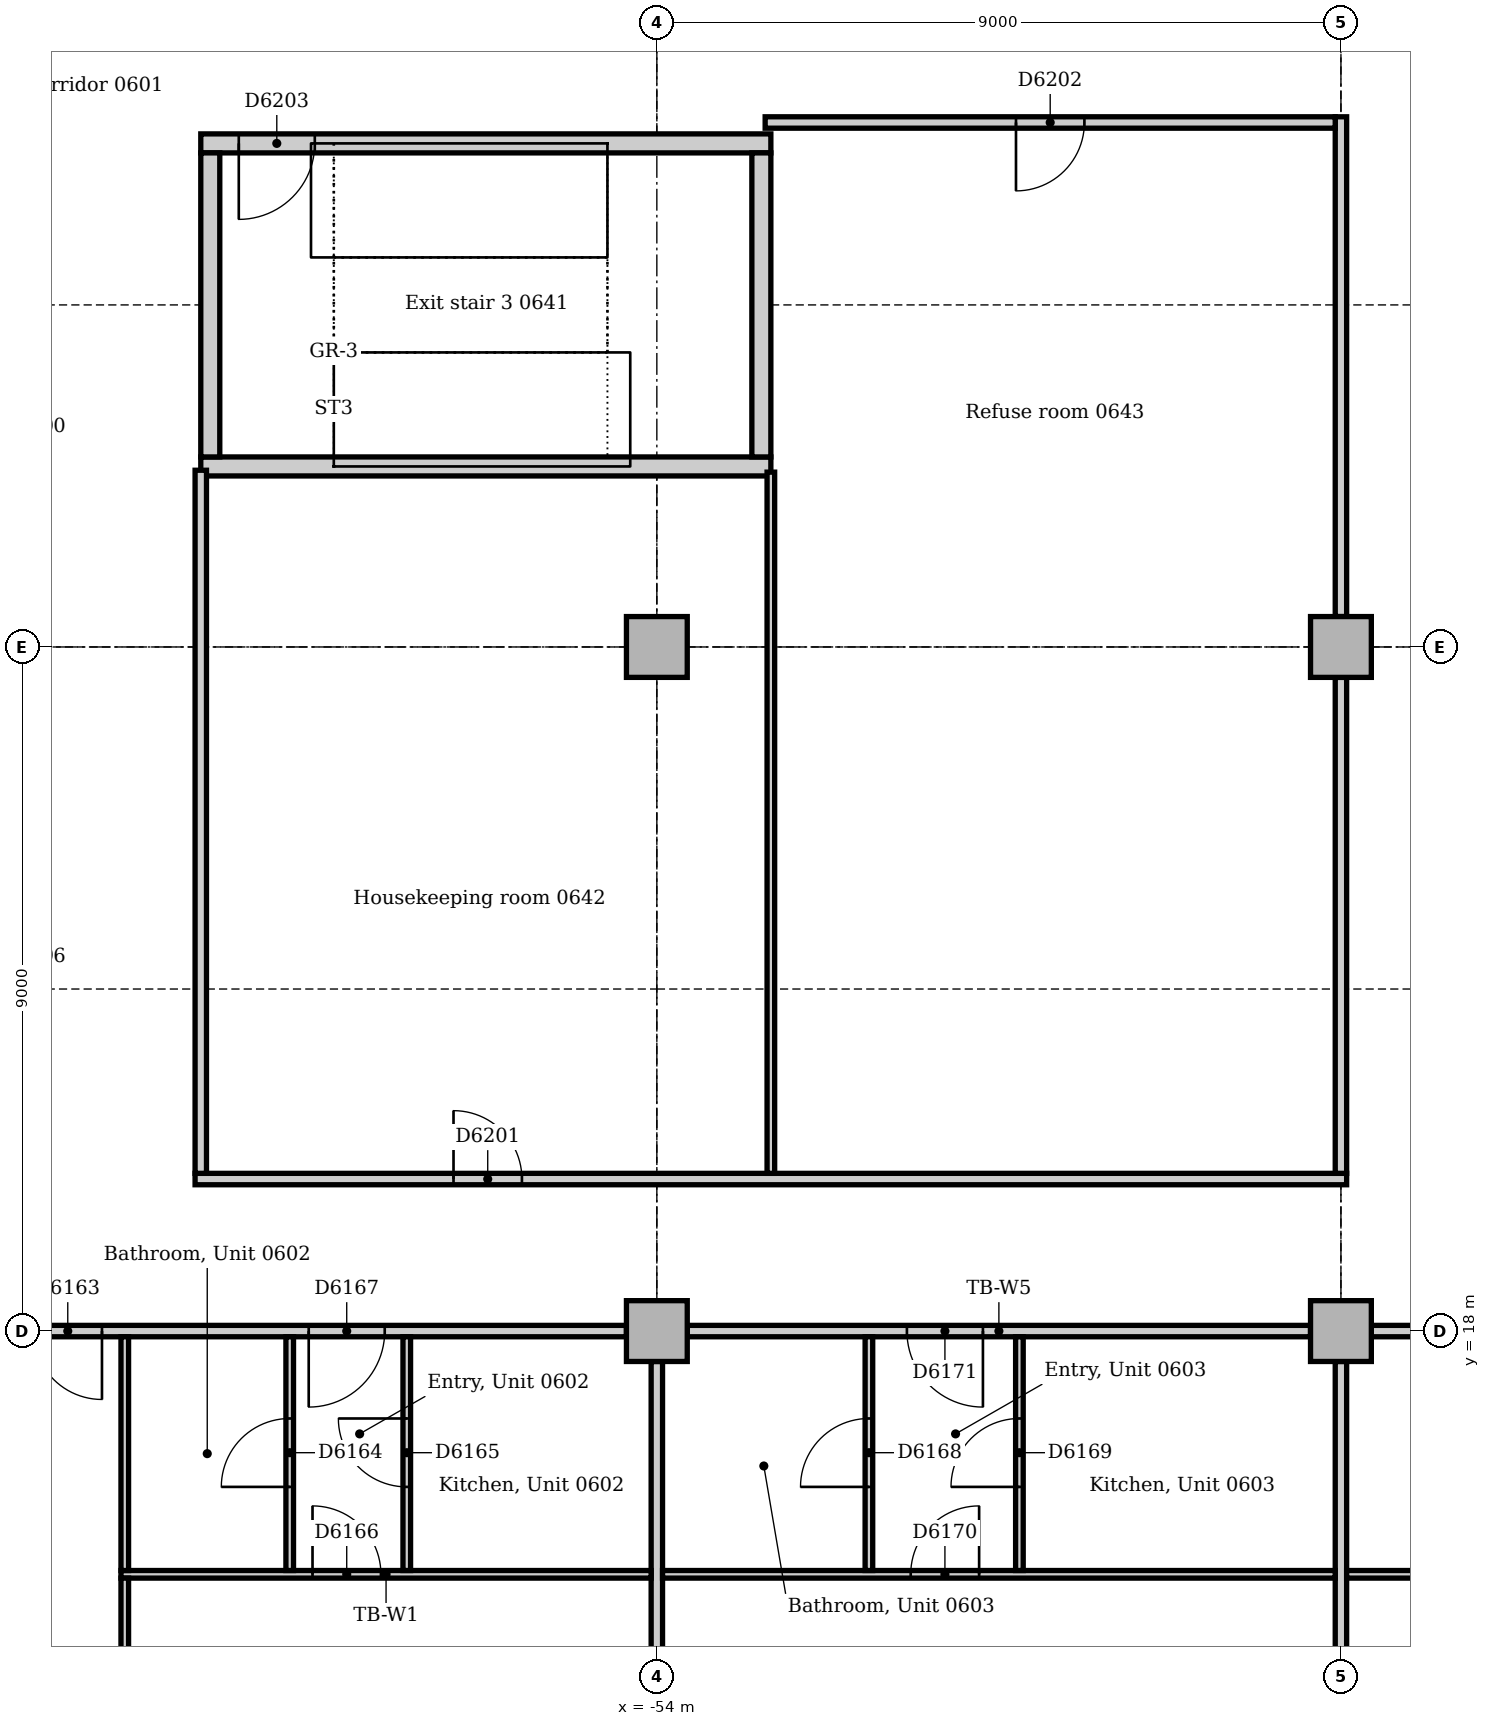
"""IFC4 building model, lengths in metres.
Left out: names, types, materials, properties, quantities, classifications, styles, units other than length and angle.
Written with IfcOpenShell. Run it as: python <this file> out.ifc"""

import sys

from ifc_helpers import new_model, si_unit, direction, frame, frame_2d, origin, origin_2d, place, context, subcontext, project, spatial, rectangle, extrude, element, fill, save


model = new_model("IFC4")
c1 = context("Model", 3, precision=1e-05, world=origin(), true_north=direction((0.0, 1.0)))
c2 = subcontext(c1, "Body", "Model", "MODEL_VIEW")
j1 = project(units=[si_unit("LENGTHUNIT", "METRE"), si_unit("PLANEANGLEUNIT", "RADIAN")], contexts=[c1])
p1 = place(None, origin())
s1 = spatial("IfcSite", under=j1, at=p1, CompositionType="ELEMENT")
p2 = place(p1, origin())
s2 = spatial("IfcBuilding", under=s1, at=p2, CompositionType="ELEMENT")
p3 = place(p2, frame((0.0, 0.0, 30.0)))
s3 = spatial("IfcBuildingStorey", under=s2, at=p3, CompositionType="ELEMENT", Elevation=30.0)
p4 = place(p3, frame((-60.0, 29.375, 0.0), z_axis=(0.0, 0.0, 1.0), x_axis=(1.0, 0.0, 0.0)))
e1 = element("IfcWall", 1, at=p4, inside=s3, PredefinedType="SOLIDWALL", context=c2, shape_type="SweptSolid", body=[
    extrude(rectangle(XDim=7.5, YDim=0.25, at=frame_2d((3.75, 0.0))), origin(), (0.0, 0.0, 1.0), 4.0),
])
p5 = place(p3, frame((-52.5, 33.625, 0.0), z_axis=(0.0, 0.0, 1.0), x_axis=(-1.0, 0.0, 0.0)))
e2 = element("IfcWall", 2, at=p5, inside=s3, PredefinedType="SOLIDWALL", context=c2, shape_type="SweptSolid", body=[
    extrude(rectangle(XDim=7.5, YDim=0.25, at=frame_2d((3.75, 0.0))), origin(), (0.0, 0.0, 1.0), 4.0),
])
p6 = place(p5, frame((6.0, 0.0, 0.0)))
e3 = element("IfcOpeningElement", 3, at=p6, cuts=e2, PredefinedType="OPENING", context=c2, shape_type="SweptSolid", body=[
    extrude(rectangle(XDim=1.0, YDim=2.1, at=frame_2d((0.5, 1.05))), frame((0.0, 0.135, 0.0), z_axis=(0.0, -1.0, 0.0), x_axis=(1.0, 0.0, 0.0)), (0.0, 0.0, 1.0), 0.27),
])
for number, where, z_axis, x_axis in (
    (4, (-52.625, 29.5, 0.0), (0.0, 0.0, 1.0), (0.0, 1.0, 0.0)),
    (5, (-59.875, 33.5, 0.0), (0.0, 0.0, 1.0), (0.0, -1.0, 0.0)),
):
    element("IfcWall", number, at=place(p3, frame(where, z_axis=z_axis, x_axis=x_axis)), inside=s3, PredefinedType="SOLIDWALL", context=c2, shape_type="SweptSolid", body=[
        extrude(rectangle(XDim=4.0, YDim=0.25, at=frame_2d((2.0, 0.0))), origin(), (0.0, 0.0, 1.0), 4.0),
    ])
for number, where, z_axis, x_axis in (
    (6, (-54.0, 18.0, 0.0), (0.0, 0.0, 1.0), (1.0, 0.0, 0.0)),
    (7, (-54.0, 27.0, 0.0), (0.0, 0.0, 1.0), (1.0, 0.0, 0.0)),
    (8, (-45.0, 18.0, 0.0), (0.0, 0.0, 1.0), (1.0, 0.0, 0.0)),
    (9, (-45.0, 27.0, 0.0), (0.0, 0.0, 1.0), (1.0, 0.0, 0.0)),
):
    element("IfcColumn", number, at=place(p3, frame(where, z_axis=z_axis, x_axis=x_axis)), inside=s3, PredefinedType="COLUMN", context=c2, shape_type="SweptSolid", body=[
        extrude(rectangle(XDim=0.8, YDim=0.8, at=origin_2d()), origin(), (0.0, 0.0, 1.0), 3.85),
    ])
p7 = place(p3, frame((-44.6, 18.0, 0.0), z_axis=(0.0, 0.0, 1.0), x_axis=(1.0, 0.0, 0.0)))
e10 = element("IfcWall", 10, at=p7, inside=s3, PredefinedType="PARTITIONING", context=c2, shape_type="SweptSolid", body=[
    extrude(rectangle(XDim=8.2, YDim=0.15, at=frame_2d((4.1, 0.0))), origin(), (0.0, 0.0, 1.0), 3.15),
])
p8 = place(p7, frame((3.0, 0.0, 0.0)))
e11 = element("IfcOpeningElement", 11, at=p8, cuts=e10, PredefinedType="OPENING", context=c2, shape_type="SweptSolid", body=[
    extrude(rectangle(XDim=1.0, YDim=2.1, at=frame_2d((0.5, 1.05))), frame((0.0, 0.085, 0.0), z_axis=(0.0, -1.0, 0.0), x_axis=(1.0, 0.0, 0.0)), (0.0, 0.0, 1.0), 0.17),
])
p9 = place(p3, frame((-53.6, 18.0, 0.0), z_axis=(0.0, 0.0, 1.0), x_axis=(1.0, 0.0, 0.0)))
e12 = element("IfcWall", 12, at=p9, inside=s3, PredefinedType="PARTITIONING", context=c2, shape_type="SweptSolid", body=[
    extrude(rectangle(XDim=8.2, YDim=0.15, at=frame_2d((4.1, 0.0))), origin(), (0.0, 0.0, 1.0), 3.15),
])
p10 = place(p9, frame((2.89, 0.0, 0.0)))
e13 = element("IfcOpeningElement", 13, at=p10, cuts=e12, PredefinedType="OPENING", context=c2, shape_type="SweptSolid", body=[
    extrude(rectangle(XDim=1.0, YDim=2.1, at=frame_2d((0.5, 1.05))), frame((0.0, 0.085, 0.0), z_axis=(0.0, -1.0, 0.0), x_axis=(1.0, 0.0, 0.0)), (0.0, 0.0, 1.0), 0.17),
])
p11 = place(p3, frame((-62.6, 18.0, 0.0), z_axis=(0.0, 0.0, 1.0), x_axis=(1.0, 0.0, 0.0)))
e14 = element("IfcWall", 14, at=p11, inside=s3, PredefinedType="PARTITIONING", context=c2, shape_type="SweptSolid", body=[
    extrude(rectangle(XDim=8.2, YDim=0.15, at=frame_2d((4.1, 0.0))), origin(), (0.0, 0.0, 1.0), 3.15),
])
p12 = place(p11, frame((0.4, 0.0, 0.0)))
e15 = element("IfcOpeningElement", 15, at=p12, cuts=e14, PredefinedType="OPENING", context=c2, shape_type="SweptSolid", body=[
    extrude(rectangle(XDim=0.9, YDim=2.1, at=frame_2d((0.45, 1.05))), frame((0.0, 0.085, 0.0), z_axis=(0.0, -1.0, 0.0), x_axis=(1.0, 0.0, 0.0)), (0.0, 0.0, 1.0), 0.17),
])
p13 = place(p11, frame((4.02, 0.0, 0.0)))
e16 = element("IfcOpeningElement", 16, at=p13, cuts=e14, PredefinedType="OPENING", context=c2, shape_type="SweptSolid", body=[
    extrude(rectangle(XDim=1.0, YDim=2.1, at=frame_2d((0.5, 1.05))), frame((0.0, 0.085, 0.0), z_axis=(0.0, -1.0, 0.0), x_axis=(1.0, 0.0, 0.0)), (0.0, 0.0, 1.0), 0.17),
])
p14 = place(p3, frame((-60.075, 20.0, 0.0), z_axis=(0.0, 0.0, 1.0), x_axis=(1.0, 0.0, 0.0)))
e17 = element("IfcWall", 17, at=p14, inside=s3, PredefinedType="PARTITIONING", context=c2, shape_type="SweptSolid", body=[
    extrude(rectangle(XDim=15.15, YDim=0.15, at=frame_2d((7.575, 0.0))), origin(), (0.0, 0.0, 1.0), 3.85),
])
p15 = place(p14, frame((3.4, 0.0, 0.0)))
e18 = element("IfcOpeningElement", 18, at=p15, cuts=e17, PredefinedType="OPENING", context=c2, shape_type="SweptSolid", body=[
    extrude(rectangle(XDim=0.9, YDim=2.1, at=frame_2d((0.45, 1.05))), frame((0.0, 0.085, 0.0), z_axis=(0.0, -1.0, 0.0), x_axis=(1.0, 0.0, 0.0)), (0.0, 0.0, 1.0), 0.17),
])
p16 = place(p3, frame((-45.0, 20.075, 0.0), z_axis=(0.0, 0.0, 1.0), x_axis=(0.0, 1.0, 0.0)))
e19 = element("IfcWall", 19, at=p16, inside=s3, PredefinedType="PARTITIONING", context=c2, shape_type="SweptSolid", body=[
    extrude(rectangle(XDim=6.525, YDim=0.15, at=frame_2d((3.263, 0.0))), origin(), (0.0, 0.0, 1.0), 3.158),
])
p17 = place(p3, frame((-45.0, 27.4, 0.0), z_axis=(0.0, 0.0, 1.0), x_axis=(0.0, 1.0, 0.0)))
e20 = element("IfcWall", 20, at=p17, inside=s3, PredefinedType="PARTITIONING", context=c2, shape_type="SweptSolid", body=[
    extrude(rectangle(XDim=6.575, YDim=0.15, at=frame_2d((3.288, 0.0))), origin(), (0.0, 0.0, 1.0), 3.158),
])
p18 = place(p3, frame((-60.0, 20.075, 0.0), z_axis=(0.0, 0.0, 1.0), x_axis=(0.0, 1.0, 0.0)))
e21 = element("IfcWall", 21, at=p18, inside=s3, PredefinedType="PARTITIONING", context=c2, shape_type="SweptSolid", body=[
    extrude(rectangle(XDim=9.25, YDim=0.15, at=frame_2d((4.625, 0.0))), origin(), (0.0, 0.0, 1.0), 3.85),
])
p19 = place(p3, frame((-52.575, 33.9, 0.0), z_axis=(0.0, 0.0, 1.0), x_axis=(1.0, 0.0, 0.0)))
e22 = element("IfcWall", 22, at=p19, inside=s3, PredefinedType="PARTITIONING", context=c2, shape_type="SweptSolid", body=[
    extrude(rectangle(XDim=7.5, YDim=0.15, at=frame_2d((3.75, 0.0))), origin(), (0.0, 0.0, 1.0), 3.85),
])
p20 = place(p19, frame((3.3, 0.0, 0.0)))
e23 = element("IfcOpeningElement", 23, at=p20, cuts=e22, PredefinedType="OPENING", context=c2, shape_type="SweptSolid", body=[
    extrude(rectangle(XDim=0.9, YDim=2.1, at=frame_2d((0.45, 1.05))), frame((0.0, 0.085, 0.0), z_axis=(0.0, -1.0, 0.0), x_axis=(1.0, 0.0, 0.0)), (0.0, 0.0, 1.0), 0.17),
])
for number, where, z_axis, x_axis in (
    (24, (-54.0, 9.4, 0.0), (0.0, 0.0, 1.0), (0.0, 1.0, 0.0)),
    (25, (-45.0, 9.4, 0.0), (0.0, 0.0, 1.0), (0.0, 1.0, 0.0)),
):
    element("IfcWall", number, at=place(p3, frame(where, z_axis=z_axis, x_axis=x_axis)), inside=s3, PredefinedType="PARTITIONING", context=c2, shape_type="SweptSolid", body=[
        extrude(rectangle(XDim=8.2, YDim=0.15, at=frame_2d((4.1, 0.0))), origin(), (0.0, 0.0, 1.0), 3.158),
    ])
p21 = place(p3, frame((-61.05, 14.8, 0.0), z_axis=(0.0, 0.0, 1.0), x_axis=(1.0, 0.0, 0.0)))
e26 = element("IfcWall", 26, at=p21, inside=s3, PredefinedType="PARTITIONING", context=c2, shape_type="SweptSolid", body=[
    extrude(rectangle(XDim=6.975, YDim=0.1, at=frame_2d((3.487, 0.0))), origin(), (0.0, 0.0, 1.0), 3.85),
])
p22 = place(p21, frame((2.52, 0.0, 0.0)))
e27 = element("IfcOpeningElement", 27, at=p22, cuts=e26, PredefinedType="OPENING", context=c2, shape_type="SweptSolid", body=[
    extrude(rectangle(XDim=0.9, YDim=2.1, at=frame_2d((0.45, 1.05))), frame((0.0, 0.06, 0.0), z_axis=(0.0, -1.0, 0.0), x_axis=(1.0, 0.0, 0.0)), (0.0, 0.0, 1.0), 0.12),
])
p23 = place(p3, frame((-53.925, 14.8, 0.0), z_axis=(0.0, 0.0, 1.0), x_axis=(1.0, 0.0, 0.0)))
e28 = element("IfcWall", 28, at=p23, inside=s3, PredefinedType="PARTITIONING", context=c2, shape_type="SweptSolid", body=[
    extrude(rectangle(XDim=8.85, YDim=0.1, at=frame_2d((4.425, 0.0))), origin(), (0.0, 0.0, 1.0), 3.85),
])
p24 = place(p23, frame((3.265, 0.0, 0.0)))
e29 = element("IfcOpeningElement", 29, at=p24, cuts=e28, PredefinedType="OPENING", context=c2, shape_type="SweptSolid", body=[
    extrude(rectangle(XDim=0.9, YDim=2.1, at=frame_2d((0.45, 1.05))), frame((0.0, 0.06, 0.0), z_axis=(0.0, -1.0, 0.0), x_axis=(1.0, 0.0, 0.0)), (0.0, 0.0, 1.0), 0.12),
])
p25 = place(p3, frame((-44.925, 14.8, 0.0), z_axis=(0.0, 0.0, 1.0), x_axis=(1.0, 0.0, 0.0)))
e30 = element("IfcWall", 30, at=p25, inside=s3, PredefinedType="PARTITIONING", context=c2, shape_type="SweptSolid", body=[
    extrude(rectangle(XDim=8.85, YDim=0.1, at=frame_2d((4.425, 0.0))), origin(), (0.0, 0.0, 1.0), 3.85),
])
p26 = place(p25, frame((3.265, 0.0, 0.0)))
e31 = element("IfcOpeningElement", 31, at=p26, cuts=e30, PredefinedType="OPENING", context=c2, shape_type="SweptSolid", body=[
    extrude(rectangle(XDim=0.9, YDim=2.1, at=frame_2d((0.45, 1.05))), frame((0.0, 0.06, 0.0), z_axis=(0.0, -1.0, 0.0), x_axis=(1.0, 0.0, 0.0)), (0.0, 0.0, 1.0), 0.12),
])
p27 = place(p3, frame((-61.0, 14.85, 0.0), z_axis=(0.0, 0.0, 1.0), x_axis=(0.0, 1.0, 0.0)))
e32 = element("IfcWall", 32, at=p27, inside=s3, PredefinedType="PARTITIONING", context=c2, shape_type="SweptSolid", body=[
    extrude(rectangle(XDim=3.075, YDim=0.1, at=frame_2d((1.538, 0.0))), origin(), (0.0, 0.0, 1.0), 3.85),
])
p28 = place(p3, frame((-61.0, 4.86, 0.0), z_axis=(0.0, 0.0, 1.0), x_axis=(0.0, 1.0, 0.0)))
e33 = element("IfcWall", 33, at=p28, inside=s3, PredefinedType="PARTITIONING", context=c2, shape_type="SweptSolid", body=[
    extrude(rectangle(XDim=9.89, YDim=0.1, at=frame_2d((4.945, 0.0))), origin(), (0.0, 0.0, 1.0), 3.85),
])
p29 = place(p3, frame((-52.5, 20.075, 0.0), z_axis=(0.0, 0.0, 1.0), x_axis=(0.0, 1.0, 0.0)))
e34 = element("IfcWall", 34, at=p29, inside=s3, PredefinedType="PARTITIONING", context=c2, shape_type="SweptSolid", body=[
    extrude(rectangle(XDim=9.225, YDim=0.1, at=frame_2d((4.612, 0.0))), origin(), (0.0, 0.0, 1.0), 3.85),
])
p30 = place(p3, frame((-58.83, 14.85, 0.0), z_axis=(0.0, 0.0, 1.0), x_axis=(0.0, 1.0, 0.0)))
e35 = element("IfcWall", 35, at=p30, inside=s3, PredefinedType="PARTITIONING", context=c2, shape_type="SweptSolid", body=[
    extrude(rectangle(XDim=3.075, YDim=0.1, at=frame_2d((1.538, 0.0))), origin(), (0.0, 0.0, 1.0), 3.85),
])
p31 = place(p30, frame((1.1, 0.0, 0.0)))
e36 = element("IfcOpeningElement", 36, at=p31, cuts=e35, PredefinedType="OPENING", context=c2, shape_type="SweptSolid", body=[
    extrude(rectangle(XDim=0.9, YDim=2.1, at=frame_2d((0.45, 1.05))), frame((0.0, 0.06, 0.0), z_axis=(0.0, -1.0, 0.0), x_axis=(1.0, 0.0, 0.0)), (0.0, 0.0, 1.0), 0.12),
])
p32 = place(p3, frame((-57.29, 14.85, 0.0), z_axis=(0.0, 0.0, 1.0), x_axis=(0.0, 1.0, 0.0)))
e37 = element("IfcWall", 37, at=p32, inside=s3, PredefinedType="PARTITIONING", context=c2, shape_type="SweptSolid", body=[
    extrude(rectangle(XDim=3.075, YDim=0.1, at=frame_2d((1.538, 0.0))), origin(), (0.0, 0.0, 1.0), 3.85),
])
p33 = place(p32, frame((1.1, 0.0, 0.0)))
e38 = element("IfcOpeningElement", 38, at=p33, cuts=e37, PredefinedType="OPENING", context=c2, shape_type="SweptSolid", body=[
    extrude(rectangle(XDim=0.9, YDim=2.1, at=frame_2d((0.45, 1.05))), frame((0.0, 0.06, 0.0), z_axis=(0.0, -1.0, 0.0), x_axis=(1.0, 0.0, 0.0)), (0.0, 0.0, 1.0), 0.12),
])
p34 = place(p3, frame((-51.21, 14.85, 0.0), z_axis=(0.0, 0.0, 1.0), x_axis=(0.0, 1.0, 0.0)))
e39 = element("IfcWall", 39, at=p34, inside=s3, PredefinedType="PARTITIONING", context=c2, shape_type="SweptSolid", body=[
    extrude(rectangle(XDim=3.075, YDim=0.1, at=frame_2d((1.538, 0.0))), origin(), (0.0, 0.0, 1.0), 3.85),
])
p35 = place(p34, frame((1.1, 0.0, 0.0)))
e40 = element("IfcOpeningElement", 40, at=p35, cuts=e39, PredefinedType="OPENING", context=c2, shape_type="SweptSolid", body=[
    extrude(rectangle(XDim=0.9, YDim=2.1, at=frame_2d((0.45, 1.05))), frame((0.0, 0.06, 0.0), z_axis=(0.0, -1.0, 0.0), x_axis=(1.0, 0.0, 0.0)), (0.0, 0.0, 1.0), 0.12),
])
p36 = place(p3, frame((-49.23, 14.85, 0.0), z_axis=(0.0, 0.0, 1.0), x_axis=(0.0, 1.0, 0.0)))
e41 = element("IfcWall", 41, at=p36, inside=s3, PredefinedType="PARTITIONING", context=c2, shape_type="SweptSolid", body=[
    extrude(rectangle(XDim=3.075, YDim=0.1, at=frame_2d((1.538, 0.0))), origin(), (0.0, 0.0, 1.0), 3.85),
])
p37 = place(p36, frame((1.1, 0.0, 0.0)))
e42 = element("IfcOpeningElement", 42, at=p37, cuts=e41, PredefinedType="OPENING", context=c2, shape_type="SweptSolid", body=[
    extrude(rectangle(XDim=0.9, YDim=2.1, at=frame_2d((0.45, 1.05))), frame((0.0, 0.06, 0.0), z_axis=(0.0, -1.0, 0.0), x_axis=(1.0, 0.0, 0.0)), (0.0, 0.0, 1.0), 0.12),
])
p38 = place(p12, frame((0.9, 0.0, 0.0), z_axis=(0.0, 0.0, 1.0), x_axis=(-1.0, 0.0, 0.0)))
e43 = element("IfcDoor", 43, at=p38, inside=s3, OperationType="SINGLE_SWING_LEFT", PredefinedType="DOOR", context=c2, shape_type="SweptSolid", body=[
    extrude(rectangle(XDim=0.9, YDim=2.1, at=frame_2d((0.45, 1.05))), frame((0.0, 0.025, 0.0), z_axis=(0.0, -1.0, 0.0), x_axis=(1.0, 0.0, 0.0)), (0.0, 0.0, 1.0), 0.05),
])
fill(e15, e43)
p39 = place(p31, origin())
e44 = element("IfcDoor", 44, at=p39, inside=s3, OperationType="SINGLE_SWING_LEFT", PredefinedType="DOOR", context=c2, shape_type="SweptSolid", body=[
    extrude(rectangle(XDim=0.9, YDim=2.1, at=frame_2d((0.45, 1.05))), frame((0.0, 0.025, 0.0), z_axis=(0.0, -1.0, 0.0), x_axis=(1.0, 0.0, 0.0)), (0.0, 0.0, 1.0), 0.05),
])
fill(e36, e44)
p40 = place(p33, origin())
e45 = element("IfcDoor", 45, at=p40, inside=s3, OperationType="SINGLE_SWING_RIGHT", PredefinedType="DOOR", context=c2, shape_type="SweptSolid", body=[
    extrude(rectangle(XDim=0.9, YDim=2.1, at=frame_2d((0.45, 1.05))), frame((0.0, 0.025, 0.0), z_axis=(0.0, -1.0, 0.0), x_axis=(1.0, 0.0, 0.0)), (0.0, 0.0, 1.0), 0.05),
])
fill(e38, e45)
p41 = place(p22, origin())
e46 = element("IfcDoor", 46, at=p41, inside=s3, OperationType="SINGLE_SWING_LEFT", PredefinedType="DOOR", context=c2, shape_type="SweptSolid", body=[
    extrude(rectangle(XDim=0.9, YDim=2.1, at=frame_2d((0.45, 1.05))), frame((0.0, 0.025, 0.0), z_axis=(0.0, -1.0, 0.0), x_axis=(1.0, 0.0, 0.0)), (0.0, 0.0, 1.0), 0.05),
])
fill(e27, e46)
p42 = place(p13, frame((1.0, 0.0, 0.0), z_axis=(0.0, 0.0, 1.0), x_axis=(-1.0, 0.0, 0.0)))
e47 = element("IfcDoor", 47, at=p42, inside=s3, OperationType="SINGLE_SWING_RIGHT", PredefinedType="DOOR", context=c2, shape_type="SweptSolid", body=[
    extrude(rectangle(XDim=1.0, YDim=2.1, at=frame_2d((0.5, 1.05))), frame((0.0, 0.025, 0.0), z_axis=(0.0, -1.0, 0.0), x_axis=(1.0, 0.0, 0.0)), (0.0, 0.0, 1.0), 0.05),
])
fill(e16, e47)
p43 = place(p35, origin())
e48 = element("IfcDoor", 48, at=p43, inside=s3, OperationType="SINGLE_SWING_LEFT", PredefinedType="DOOR", context=c2, shape_type="SweptSolid", body=[
    extrude(rectangle(XDim=0.9, YDim=2.1, at=frame_2d((0.45, 1.05))), frame((0.0, 0.025, 0.0), z_axis=(0.0, -1.0, 0.0), x_axis=(1.0, 0.0, 0.0)), (0.0, 0.0, 1.0), 0.05),
])
fill(e40, e48)
p44 = place(p37, origin())
e49 = element("IfcDoor", 49, at=p44, inside=s3, OperationType="SINGLE_SWING_LEFT", PredefinedType="DOOR", context=c2, shape_type="SweptSolid", body=[
    extrude(rectangle(XDim=0.9, YDim=2.1, at=frame_2d((0.45, 1.05))), frame((0.0, 0.025, 0.0), z_axis=(0.0, -1.0, 0.0), x_axis=(1.0, 0.0, 0.0)), (0.0, 0.0, 1.0), 0.05),
])
fill(e42, e49)
p45 = place(p24, origin())
e50 = element("IfcDoor", 50, at=p45, inside=s3, OperationType="SINGLE_SWING_RIGHT", PredefinedType="DOOR", context=c2, shape_type="SweptSolid", body=[
    extrude(rectangle(XDim=0.9, YDim=2.1, at=frame_2d((0.45, 1.05))), frame((0.0, 0.025, 0.0), z_axis=(0.0, -1.0, 0.0), x_axis=(1.0, 0.0, 0.0)), (0.0, 0.0, 1.0), 0.05),
])
fill(e29, e50)
p46 = place(p10, frame((1.0, 0.0, 0.0), z_axis=(0.0, 0.0, 1.0), x_axis=(-1.0, 0.0, 0.0)))
e51 = element("IfcDoor", 51, at=p46, inside=s3, OperationType="SINGLE_SWING_LEFT", PredefinedType="DOOR", context=c2, shape_type="SweptSolid", body=[
    extrude(rectangle(XDim=1.0, YDim=2.1, at=frame_2d((0.5, 1.05))), frame((0.0, 0.025, 0.0), z_axis=(0.0, -1.0, 0.0), x_axis=(1.0, 0.0, 0.0)), (0.0, 0.0, 1.0), 0.05),
])
fill(e13, e51)
p47 = place(p15, origin())
e52 = element("IfcDoor", 52, at=p47, inside=s3, OperationType="SINGLE_SWING_LEFT", PredefinedType="DOOR", context=c2, shape_type="SweptSolid", body=[
    extrude(rectangle(XDim=0.9, YDim=2.1, at=frame_2d((0.45, 1.05))), frame((0.0, 0.025, 0.0), z_axis=(0.0, -1.0, 0.0), x_axis=(1.0, 0.0, 0.0)), (0.0, 0.0, 1.0), 0.05),
])
fill(e18, e52)
p48 = place(p20, frame((0.9, 0.0, 0.0), z_axis=(0.0, 0.0, 1.0), x_axis=(-1.0, 0.0, 0.0)))
e53 = element("IfcDoor", 53, at=p48, inside=s3, OperationType="SINGLE_SWING_RIGHT", PredefinedType="DOOR", context=c2, shape_type="SweptSolid", body=[
    extrude(rectangle(XDim=0.9, YDim=2.1, at=frame_2d((0.45, 1.05))), frame((0.0, 0.025, 0.0), z_axis=(0.0, -1.0, 0.0), x_axis=(1.0, 0.0, 0.0)), (0.0, 0.0, 1.0), 0.05),
])
fill(e23, e53)
p49 = place(p6, origin())
e54 = element("IfcDoor", 54, at=p49, inside=s3, OperationType="SINGLE_SWING_RIGHT", PredefinedType="DOOR", context=c2, shape_type="SweptSolid", body=[
    extrude(rectangle(XDim=1.0, YDim=2.1, at=frame_2d((0.5, 1.05))), frame((0.0, 0.025, 0.0), z_axis=(0.0, -1.0, 0.0), x_axis=(1.0, 0.0, 0.0)), (0.0, 0.0, 1.0), 0.05),
])
fill(e3, e54)
save(model, sys.argv[1])
